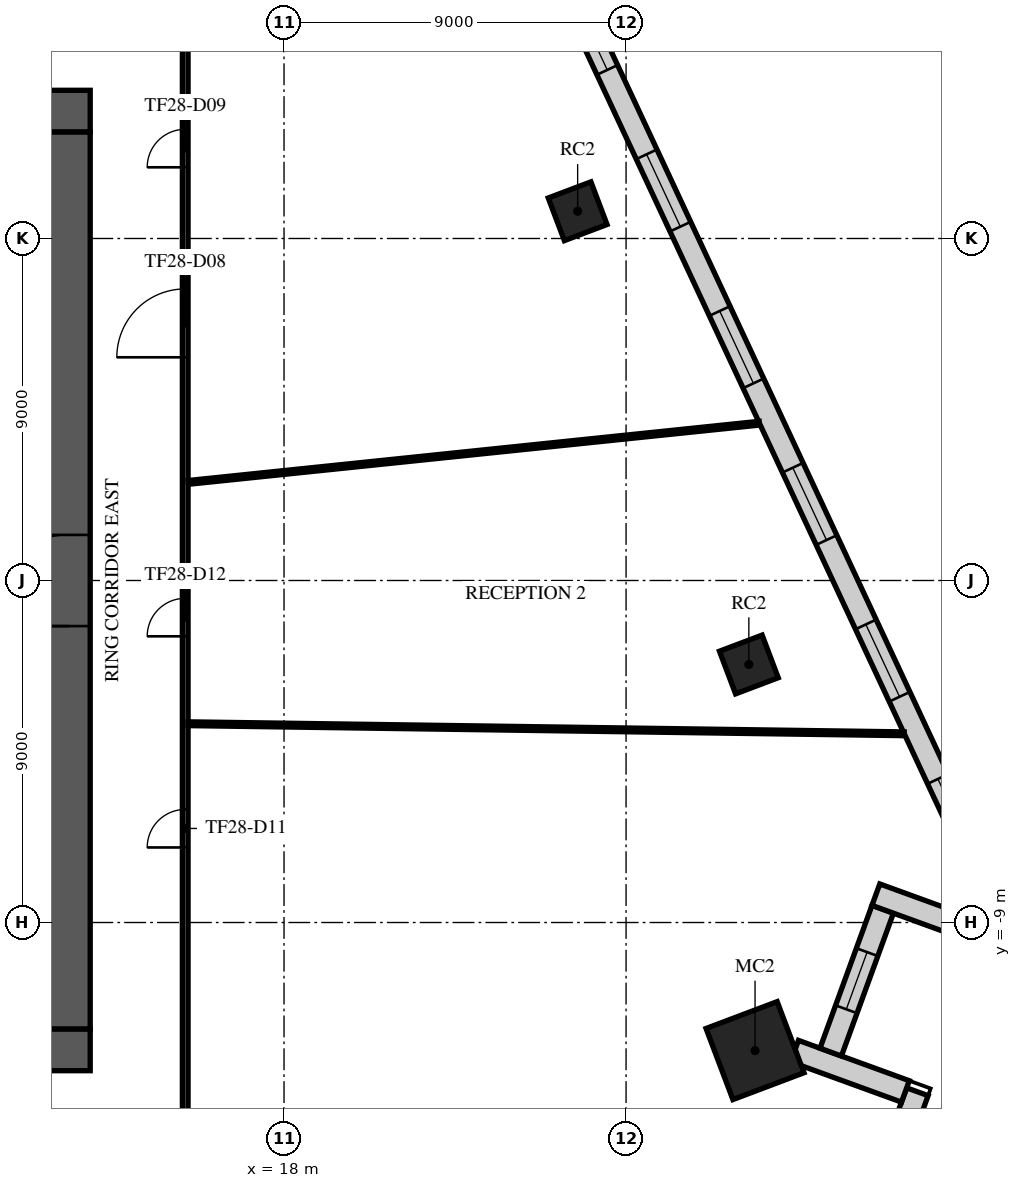
"""IFC4 building model, lengths in metres.
Left out: names, types, materials, properties, quantities, classifications, styles, units other than length and angle.
Written with IfcOpenShell. Run it as: python <this file> out.ifc"""

import sys

from ifc_helpers import new_model, si_unit, direction, frame, frame_2d, origin, origin_2d, place, context, subcontext, project, spatial, rectangle, extrude, element, fill, save


model = new_model("IFC4")
c1 = context("Model", 3, precision=1e-05, world=origin(), true_north=direction((0.0, 1.0)))
c2 = subcontext(c1, "Body", "Model", "MODEL_VIEW")
j1 = project(units=[si_unit("LENGTHUNIT", "METRE"), si_unit("PLANEANGLEUNIT", "RADIAN")], contexts=[c1])
p1 = place(None, origin())
s1 = spatial("IfcSite", under=j1, at=p1, CompositionType="ELEMENT")
p2 = place(p1, origin())
s2 = spatial("IfcBuilding", under=s1, at=p2, CompositionType="ELEMENT")
p3 = place(p2, frame((0.0, 0.0, 122.1)))
s3 = spatial("IfcBuildingStorey", under=s2, at=p3, CompositionType="ELEMENT", Elevation=122.1)
p4 = place(p3, frame((30.394, -12.371, 0.0), z_axis=(0.0, 0.0, 1.0), x_axis=(0.935491525991, 0.353349125935, 0.0)))
e1 = element("IfcColumn", 1, at=p4, inside=s3, PredefinedType="COLUMN", context=c2, shape_type="SweptSolid", body=[
    extrude(rectangle(XDim=2.0, YDim=2.0, at=origin_2d()), origin(), (0.0, 0.0, 1.0), 4.0),
])
for number, where, z_axis, x_axis in (
    (2, (30.231, -2.21, 0.0), (0.0, 0.0, 1.0), (0.935, 0.353, 0.0)),
    (3, (25.726, 9.717, 0.0), (0.0, 0.0, 1.0), (0.935, 0.353, 0.0)),
):
    element("IfcColumn", number, at=place(p3, frame(where, z_axis=z_axis, x_axis=x_axis)), inside=s3, PredefinedType="COLUMN", context=c2, shape_type="SweptSolid", body=[
        extrude(rectangle(XDim=1.2, YDim=1.2, at=origin_2d()), origin(), (0.0, 0.0, 1.0), 4.0),
    ])
p5 = place(p3, frame((-12.9, 12.35, 0.0), z_axis=(0.0, 0.0, 1.0), x_axis=(1.0, 0.0, 0.0)))
e4 = element("IfcWall", 4, at=p5, inside=s3, PredefinedType="SHEAR", context=c2, shape_type="SweptSolid", body=[
    extrude(rectangle(XDim=25.8, YDim=1.1, at=frame_2d((12.9, 0.0))), origin(), (0.0, 0.0, 1.0), 3.58),
])
p6 = place(p5, frame((11.7, 0.0, 0.0)))
e5 = element("IfcOpeningElement", 5, at=p6, cuts=e4, PredefinedType="OPENING", context=c2, shape_type="SweptSolid", body=[
    extrude(rectangle(XDim=2.4, YDim=2.4, at=frame_2d((1.2, 1.2))), frame((0.0, 0.56, 0.0), z_axis=(0.0, -1.0, 0.0), x_axis=(1.0, 0.0, 0.0)), (0.0, 0.0, 1.0), 1.12),
])
p7 = place(p5, frame((22.525, 0.0, 0.0)))
e6 = element("IfcOpeningElement", 6, at=p7, cuts=e4, PredefinedType="OPENING", context=c2, shape_type="SweptSolid", body=[
    extrude(rectangle(XDim=1.2, YDim=2.1, at=frame_2d((0.6, 1.05))), frame((0.0, 0.56, 0.0), z_axis=(0.0, -1.0, 0.0), x_axis=(1.0, 0.0, 0.0)), (0.0, 0.0, 1.0), 1.12),
])
p8 = place(p5, frame((1.5, 0.0, 0.0)))
e7 = element("IfcOpeningElement", 7, at=p8, cuts=e4, PredefinedType="OPENING", context=c2, shape_type="SweptSolid", body=[
    extrude(rectangle(XDim=1.0, YDim=2.1, at=frame_2d((0.5, 1.05))), frame((0.0, 0.56, 0.0), z_axis=(0.0, -1.0, 0.0), x_axis=(1.0, 0.0, 0.0)), (0.0, 0.0, 1.0), 1.12),
])
p9 = place(p3, frame((-12.9, -12.35, 0.0), z_axis=(0.0, 0.0, 1.0), x_axis=(1.0, 0.0, 0.0)))
e8 = element("IfcWall", 8, at=p9, inside=s3, PredefinedType="SHEAR", context=c2, shape_type="SweptSolid", body=[
    extrude(rectangle(XDim=25.8, YDim=1.1, at=frame_2d((12.9, 0.0))), origin(), (0.0, 0.0, 1.0), 3.58),
])
p10 = place(p9, frame((7.8, 0.0, 0.0)))
e9 = element("IfcOpeningElement", 9, at=p10, cuts=e8, PredefinedType="OPENING", context=c2, shape_type="SweptSolid", body=[
    extrude(rectangle(XDim=2.0, YDim=2.1, at=frame_2d((1.0, 1.05))), frame((0.0, 0.56, 0.0), z_axis=(0.0, -1.0, 0.0), x_axis=(1.0, 0.0, 0.0)), (0.0, 0.0, 1.0), 1.12),
])
p11 = place(p9, frame((17.925, 0.0, 0.0)))
e10 = element("IfcOpeningElement", 10, at=p11, cuts=e8, PredefinedType="OPENING", context=c2, shape_type="SweptSolid", body=[
    extrude(rectangle(XDim=1.2, YDim=2.1, at=frame_2d((0.6, 1.05))), frame((0.0, 0.56, 0.0), z_axis=(0.0, -1.0, 0.0), x_axis=(1.0, 0.0, 0.0)), (0.0, 0.0, 1.0), 1.12),
])
p12 = place(p9, frame((2.075, 0.0, 0.0)))
e11 = element("IfcOpeningElement", 11, at=p12, cuts=e8, PredefinedType="OPENING", context=c2, shape_type="SweptSolid", body=[
    extrude(rectangle(XDim=1.2, YDim=2.1, at=frame_2d((0.6, 1.05))), frame((0.0, 0.56, 0.0), z_axis=(0.0, -1.0, 0.0), x_axis=(1.0, 0.0, 0.0)), (0.0, 0.0, 1.0), 1.12),
])
p13 = place(p9, frame((22.525, 0.0, 0.0)))
e12 = element("IfcOpeningElement", 12, at=p13, cuts=e8, PredefinedType="OPENING", context=c2, shape_type="SweptSolid", body=[
    extrude(rectangle(XDim=1.2, YDim=2.1, at=frame_2d((0.6, 1.05))), frame((0.0, 0.56, 0.0), z_axis=(0.0, -1.0, 0.0), x_axis=(1.0, 0.0, 0.0)), (0.0, 0.0, 1.0), 1.12),
])
p14 = place(p3, frame((12.35, -11.8, 0.0), z_axis=(0.0, 0.0, 1.0), x_axis=(0.0, 1.0, 0.0)))
e13 = element("IfcWall", 13, at=p14, inside=s3, PredefinedType="SHEAR", context=c2, shape_type="SweptSolid", body=[
    extrude(rectangle(XDim=23.6, YDim=1.1, at=frame_2d((11.8, 0.0))), origin(), (0.0, 0.0, 1.0), 3.58),
])
p15 = place(p14, frame((10.6, 0.0, 0.0)))
e14 = element("IfcOpeningElement", 14, at=p15, cuts=e13, PredefinedType="OPENING", context=c2, shape_type="SweptSolid", body=[
    extrude(rectangle(XDim=2.4, YDim=2.4, at=frame_2d((1.2, 1.2))), frame((0.0, 0.56, 0.0), z_axis=(0.0, -1.0, 0.0), x_axis=(1.0, 0.0, 0.0)), (0.0, 0.0, 1.0), 1.12),
])
p16 = place(p3, frame((34.32, -14.404, 0.0), z_axis=(0.0, 0.0, 1.0), x_axis=(0.342111355193, 0.939659417368, 0.0)))
e15 = element("IfcWall", 15, at=p16, inside=s3, PredefinedType="STANDARD", context=c2, shape_type="SweptSolid", body=[
    extrude(rectangle(XDim=1.011, YDim=0.6, at=frame_2d((0.506, 0.0))), origin(), (0.0, 0.0, 1.0), 3.58),
])
p17 = place(p3, frame((34.35, -13.445, 0.0), z_axis=(0.0, 0.0, 1.0), x_axis=(-0.939708408288, 0.341976764406, 0.0)))
e16 = element("IfcWall", 16, at=p17, inside=s3, PredefinedType="STANDARD", context=c2, shape_type="SweptSolid", body=[
    extrude(rectangle(XDim=3.103, YDim=0.6, at=frame_2d((1.552, 0.0))), origin(), (0.0, 0.0, 1.0), 3.58),
])
p18 = place(p3, frame((32.385, -12.411, 0.0), z_axis=(0.0, 0.0, 1.0), x_axis=(0.342037080957, 0.939686455819, 0.0)))
e17 = element("IfcWall", 17, at=p18, inside=s3, PredefinedType="STANDARD", context=c2, shape_type="SweptSolid", body=[
    extrude(rectangle(XDim=4.0, YDim=0.6, at=frame_2d((2.0, 0.0))), origin(), (0.0, 0.0, 1.0), 3.58),
])
p19 = place(p18, frame((1.2, 0.0, 0.9)))
e18 = element("IfcOpeningElement", 18, at=p19, cuts=e17, PredefinedType="OPENING", context=c2, shape_type="SweptSolid", body=[
    extrude(rectangle(XDim=1.6, YDim=2.1, at=frame_2d((0.8, 1.05))), frame((0.0, 0.31, 0.0), z_axis=(0.0, -1.0, 0.0), x_axis=(1.0, 0.0, 0.0)), (0.0, 0.0, 1.0), 0.62),
])
p20 = place(p3, frame((33.574, -8.267, 0.0), z_axis=(0.0, 0.0, 1.0), x_axis=(0.939707859211, -0.341978273195, 0.0)))
e19 = element("IfcWall", 19, at=p20, inside=s3, PredefinedType="STANDARD", context=c2, shape_type="SweptSolid", body=[
    extrude(rectangle(XDim=2.5, YDim=0.6, at=frame_2d((1.25, 0.0))), origin(), (0.0, 0.0, 1.0), 3.58),
])
p21 = place(p3, frame((36.585, -8.181, 0.0), z_axis=(0.0, 0.0, 1.0), x_axis=(-0.422617406673, 0.906308185761, 0.0)))
e20 = element("IfcWall", 20, at=p21, inside=s3, PredefinedType="STANDARD", context=c2, shape_type="SweptSolid", body=[
    extrude(rectangle(XDim=45.375, YDim=0.6, at=frame_2d((22.688, 0.0))), origin(), (0.0, 0.0, 1.0), 3.58),
])
p22 = place(p21, frame((1.163, 0.0, 0.9)))
e21 = element("IfcOpeningElement", 21, at=p22, cuts=e20, PredefinedType="OPENING", context=c2, shape_type="SweptSolid", body=[
    extrude(rectangle(XDim=2.1, YDim=2.1, at=frame_2d((1.05, 1.05))), frame((0.0, 0.31, 0.0), z_axis=(0.0, -1.0, 0.0), x_axis=(1.0, 0.0, 0.0)), (0.0, 0.0, 1.0), 0.62),
])
p23 = place(p21, frame((5.651, 0.0, 0.9)))
e22 = element("IfcOpeningElement", 22, at=p23, cuts=e20, PredefinedType="OPENING", context=c2, shape_type="SweptSolid", body=[
    extrude(rectangle(XDim=2.1, YDim=2.1, at=frame_2d((1.05, 1.05))), frame((0.0, 0.31, 0.0), z_axis=(0.0, -1.0, 0.0), x_axis=(1.0, 0.0, 0.0)), (0.0, 0.0, 1.0), 0.62),
])
p24 = place(p21, frame((10.201, 0.0, 0.9)))
e23 = element("IfcOpeningElement", 23, at=p24, cuts=e20, PredefinedType="OPENING", context=c2, shape_type="SweptSolid", body=[
    extrude(rectangle(XDim=2.1, YDim=2.1, at=frame_2d((1.05, 1.05))), frame((0.0, 0.31, 0.0), z_axis=(0.0, -1.0, 0.0), x_axis=(1.0, 0.0, 0.0)), (0.0, 0.0, 1.0), 0.62),
])
p25 = place(p21, frame((14.751, 0.0, 0.9)))
e24 = element("IfcOpeningElement", 24, at=p25, cuts=e20, PredefinedType="OPENING", context=c2, shape_type="SweptSolid", body=[
    extrude(rectangle(XDim=2.1, YDim=2.1, at=frame_2d((1.05, 1.05))), frame((0.0, 0.31, 0.0), z_axis=(0.0, -1.0, 0.0), x_axis=(1.0, 0.0, 0.0)), (0.0, 0.0, 1.0), 0.62),
])
p26 = place(p21, frame((19.301, 0.0, 0.9)))
e25 = element("IfcOpeningElement", 25, at=p26, cuts=e20, PredefinedType="OPENING", context=c2, shape_type="SweptSolid", body=[
    extrude(rectangle(XDim=2.1, YDim=2.1, at=frame_2d((1.05, 1.05))), frame((0.0, 0.31, 0.0), z_axis=(0.0, -1.0, 0.0), x_axis=(1.0, 0.0, 0.0)), (0.0, 0.0, 1.0), 0.62),
])
p27 = place(p21, frame((23.851, 0.0, 0.9)))
e26 = element("IfcOpeningElement", 26, at=p27, cuts=e20, PredefinedType="OPENING", context=c2, shape_type="SweptSolid", body=[
    extrude(rectangle(XDim=2.1, YDim=2.1, at=frame_2d((1.05, 1.05))), frame((0.0, 0.31, 0.0), z_axis=(0.0, -1.0, 0.0), x_axis=(1.0, 0.0, 0.0)), (0.0, 0.0, 1.0), 0.62),
])
p28 = place(p21, frame((28.401, 0.0, 0.9)))
e27 = element("IfcOpeningElement", 27, at=p28, cuts=e20, PredefinedType="OPENING", context=c2, shape_type="SweptSolid", body=[
    extrude(rectangle(XDim=2.1, YDim=2.1, at=frame_2d((1.05, 1.05))), frame((0.0, 0.31, 0.0), z_axis=(0.0, -1.0, 0.0), x_axis=(1.0, 0.0, 0.0)), (0.0, 0.0, 1.0), 0.62),
])
p29 = place(p21, frame((37.501, 0.0, 0.9)))
e28 = element("IfcOpeningElement", 28, at=p29, cuts=e20, PredefinedType="OPENING", context=c2, shape_type="SweptSolid", body=[
    extrude(rectangle(XDim=2.1, YDim=2.1, at=frame_2d((1.05, 1.05))), frame((0.0, 0.31, 0.0), z_axis=(0.0, -1.0, 0.0), x_axis=(1.0, 0.0, 0.0)), (0.0, 0.0, 1.0), 0.62),
])
p30 = place(p21, frame((42.051, 0.0, 0.9)))
e29 = element("IfcOpeningElement", 29, at=p30, cuts=e20, PredefinedType="OPENING", context=c2, shape_type="SweptSolid", body=[
    extrude(rectangle(XDim=2.1, YDim=2.1, at=frame_2d((1.05, 1.05))), frame((0.0, 0.31, 0.0), z_axis=(0.0, -1.0, 0.0), x_axis=(1.0, 0.0, 0.0)), (0.0, 0.0, 1.0), 0.62),
])
p31 = place(p3, frame((15.4, -15.325, 0.0), z_axis=(0.0, 0.0, 1.0), x_axis=(0.0, 1.0, 0.0)))
e30 = element("IfcWall", 30, at=p31, inside=s3, PredefinedType="PARTITIONING", context=c2, shape_type="SweptSolid", body=[
    extrude(rectangle(XDim=30.65, YDim=0.15, at=frame_2d((15.325, 0.0))), origin(), (0.0, 0.0, 1.0), 3.08),
])
p32 = place(p31, frame((21.198, 0.0, 0.0)))
e31 = element("IfcOpeningElement", 31, at=p32, cuts=e30, PredefinedType="OPENING", context=c2, shape_type="SweptSolid", body=[
    extrude(rectangle(XDim=1.8, YDim=2.1, at=frame_2d((0.9, 1.05))), frame((0.0, 0.085, 0.0), z_axis=(0.0, -1.0, 0.0), x_axis=(1.0, 0.0, 0.0)), (0.0, 0.0, 1.0), 0.17),
])
p33 = place(p31, frame((26.198, 0.0, 0.0)))
e32 = element("IfcOpeningElement", 32, at=p33, cuts=e30, PredefinedType="OPENING", context=c2, shape_type="SweptSolid", body=[
    extrude(rectangle(XDim=1.0, YDim=2.1, at=frame_2d((0.5, 1.05))), frame((0.0, 0.085, 0.0), z_axis=(0.0, -1.0, 0.0), x_axis=(1.0, 0.0, 0.0)), (0.0, 0.0, 1.0), 0.17),
])
p34 = place(p31, frame((8.3, 0.0, 0.0)))
e33 = element("IfcOpeningElement", 33, at=p34, cuts=e30, PredefinedType="OPENING", context=c2, shape_type="SweptSolid", body=[
    extrude(rectangle(XDim=1.0, YDim=2.1, at=frame_2d((0.5, 1.05))), frame((0.0, 0.085, 0.0), z_axis=(0.0, -1.0, 0.0), x_axis=(1.0, 0.0, 0.0)), (0.0, 0.0, 1.0), 0.17),
])
p35 = place(p31, frame((13.856, 0.0, 0.0)))
e34 = element("IfcOpeningElement", 34, at=p35, cuts=e30, PredefinedType="OPENING", context=c2, shape_type="SweptSolid", body=[
    extrude(rectangle(XDim=1.0, YDim=2.1, at=frame_2d((0.5, 1.05))), frame((0.0, 0.085, 0.0), z_axis=(0.0, -1.0, 0.0), x_axis=(1.0, 0.0, 0.0)), (0.0, 0.0, 1.0), 0.17),
])
p36 = place(p3, frame((15.476, -3.769, 0.0), z_axis=(0.0, 0.0, 1.0), x_axis=(0.999901379767, -0.014043886234, 0.0)))
e35 = element("IfcWall", 35, at=p36, inside=s3, PredefinedType="PARTITIONING", context=c2, shape_type="SweptSolid", body=[
    extrude(rectangle(XDim=18.844, YDim=0.1, at=frame_2d((9.422, 0.0))), origin(), (0.0, 0.0, 1.0), 2.83),
])
p37 = place(p3, frame((15.48, 2.581, 0.0), z_axis=(0.0, 0.0, 1.0), x_axis=(0.994667182355, 0.10313678464, 0.0)))
e36 = element("IfcWall", 36, at=p37, inside=s3, PredefinedType="PARTITIONING", context=c2, shape_type="SweptSolid", body=[
    extrude(rectangle(XDim=15.107, YDim=0.1, at=frame_2d((7.554, 0.0))), origin(), (0.0, 0.0, 1.0), 2.83),
])
p38 = place(p15, origin())
e37 = element("IfcDoor", 37, at=p38, inside=s3, OperationType="SINGLE_SWING_LEFT", PredefinedType="DOOR", context=c2, shape_type="SweptSolid", body=[
    extrude(rectangle(XDim=2.4, YDim=2.4, at=frame_2d((1.2, 1.2))), frame((0.0, 0.025, 0.0), z_axis=(0.0, -1.0, 0.0), x_axis=(1.0, 0.0, 0.0)), (0.0, 0.0, 1.0), 0.05),
])
fill(e14, e37)
p39 = place(p19, origin())
e38 = element("IfcWindow", 38, at=p39, inside=s3, PartitioningType="SINGLE_PANEL", PredefinedType="WINDOW", context=c2, shape_type="SweptSolid", body=[
    extrude(rectangle(XDim=1.6, YDim=2.1, at=frame_2d((0.8, 1.05))), frame((0.0, 0.03, 0.0), z_axis=(0.0, -1.0, 0.0), x_axis=(1.0, 0.0, 0.0)), (0.0, 0.0, 1.0), 0.06),
])
fill(e18, e38)
p40 = place(p22, origin())
e39 = element("IfcWindow", 39, at=p40, inside=s3, PartitioningType="SINGLE_PANEL", PredefinedType="WINDOW", context=c2, shape_type="SweptSolid", body=[
    extrude(rectangle(XDim=2.1, YDim=2.1, at=frame_2d((1.05, 1.05))), frame((0.0, 0.03, 0.0), z_axis=(0.0, -1.0, 0.0), x_axis=(1.0, 0.0, 0.0)), (0.0, 0.0, 1.0), 0.06),
])
fill(e21, e39)
p41 = place(p23, origin())
e40 = element("IfcWindow", 40, at=p41, inside=s3, PartitioningType="SINGLE_PANEL", PredefinedType="WINDOW", context=c2, shape_type="SweptSolid", body=[
    extrude(rectangle(XDim=2.1, YDim=2.1, at=frame_2d((1.05, 1.05))), frame((0.0, 0.03, 0.0), z_axis=(0.0, -1.0, 0.0), x_axis=(1.0, 0.0, 0.0)), (0.0, 0.0, 1.0), 0.06),
])
fill(e22, e40)
p42 = place(p24, origin())
e41 = element("IfcWindow", 41, at=p42, inside=s3, PartitioningType="SINGLE_PANEL", PredefinedType="WINDOW", context=c2, shape_type="SweptSolid", body=[
    extrude(rectangle(XDim=2.1, YDim=2.1, at=frame_2d((1.05, 1.05))), frame((0.0, 0.03, 0.0), z_axis=(0.0, -1.0, 0.0), x_axis=(1.0, 0.0, 0.0)), (0.0, 0.0, 1.0), 0.06),
])
fill(e23, e41)
p43 = place(p25, origin())
e42 = element("IfcWindow", 42, at=p43, inside=s3, PartitioningType="SINGLE_PANEL", PredefinedType="WINDOW", context=c2, shape_type="SweptSolid", body=[
    extrude(rectangle(XDim=2.1, YDim=2.1, at=frame_2d((1.05, 1.05))), frame((0.0, 0.03, 0.0), z_axis=(0.0, -1.0, 0.0), x_axis=(1.0, 0.0, 0.0)), (0.0, 0.0, 1.0), 0.06),
])
fill(e24, e42)
p44 = place(p26, origin())
e43 = element("IfcWindow", 43, at=p44, inside=s3, PartitioningType="SINGLE_PANEL", PredefinedType="WINDOW", context=c2, shape_type="SweptSolid", body=[
    extrude(rectangle(XDim=2.1, YDim=2.1, at=frame_2d((1.05, 1.05))), frame((0.0, 0.03, 0.0), z_axis=(0.0, -1.0, 0.0), x_axis=(1.0, 0.0, 0.0)), (0.0, 0.0, 1.0), 0.06),
])
fill(e25, e43)
p45 = place(p27, origin())
e44 = element("IfcWindow", 44, at=p45, inside=s3, PartitioningType="SINGLE_PANEL", PredefinedType="WINDOW", context=c2, shape_type="SweptSolid", body=[
    extrude(rectangle(XDim=2.1, YDim=2.1, at=frame_2d((1.05, 1.05))), frame((0.0, 0.03, 0.0), z_axis=(0.0, -1.0, 0.0), x_axis=(1.0, 0.0, 0.0)), (0.0, 0.0, 1.0), 0.06),
])
fill(e26, e44)
p46 = place(p32, frame((1.8, 0.0, 0.0), z_axis=(0.0, 0.0, 1.0), x_axis=(-1.0, 0.0, 0.0)))
e45 = element("IfcDoor", 45, at=p46, inside=s3, OperationType="DOUBLE_DOOR_SINGLE_SWING", PredefinedType="DOOR", context=c2, shape_type="SweptSolid", body=[
    extrude(rectangle(XDim=1.8, YDim=2.1, at=frame_2d((0.9, 1.05))), frame((0.0, 0.025, 0.0), z_axis=(0.0, -1.0, 0.0), x_axis=(1.0, 0.0, 0.0)), (0.0, 0.0, 1.0), 0.05),
])
fill(e31, e45)
p47 = place(p33, frame((1.0, 0.0, 0.0), z_axis=(0.0, 0.0, 1.0), x_axis=(-1.0, 0.0, 0.0)))
e46 = element("IfcDoor", 46, at=p47, inside=s3, OperationType="SINGLE_SWING_LEFT", PredefinedType="DOOR", context=c2, shape_type="SweptSolid", body=[
    extrude(rectangle(XDim=1.0, YDim=2.1, at=frame_2d((0.5, 1.05))), frame((0.0, 0.025, 0.0), z_axis=(0.0, -1.0, 0.0), x_axis=(1.0, 0.0, 0.0)), (0.0, 0.0, 1.0), 0.05),
])
fill(e32, e46)
p48 = place(p34, frame((1.0, 0.0, 0.0), z_axis=(0.0, 0.0, 1.0), x_axis=(-1.0, 0.0, 0.0)))
e47 = element("IfcDoor", 47, at=p48, inside=s3, OperationType="SINGLE_SWING_LEFT", PredefinedType="DOOR", context=c2, shape_type="SweptSolid", body=[
    extrude(rectangle(XDim=1.0, YDim=2.1, at=frame_2d((0.5, 1.05))), frame((0.0, 0.025, 0.0), z_axis=(0.0, -1.0, 0.0), x_axis=(1.0, 0.0, 0.0)), (0.0, 0.0, 1.0), 0.05),
])
fill(e33, e47)
p49 = place(p35, frame((1.0, 0.0, 0.0), z_axis=(0.0, 0.0, 1.0), x_axis=(-1.0, 0.0, 0.0)))
e48 = element("IfcDoor", 48, at=p49, inside=s3, OperationType="SINGLE_SWING_RIGHT", PredefinedType="DOOR", context=c2, shape_type="SweptSolid", body=[
    extrude(rectangle(XDim=1.0, YDim=2.1, at=frame_2d((0.5, 1.05))), frame((0.0, 0.025, 0.0), z_axis=(0.0, -1.0, 0.0), x_axis=(1.0, 0.0, 0.0)), (0.0, 0.0, 1.0), 0.05),
])
fill(e34, e48)
save(model, sys.argv[1])
